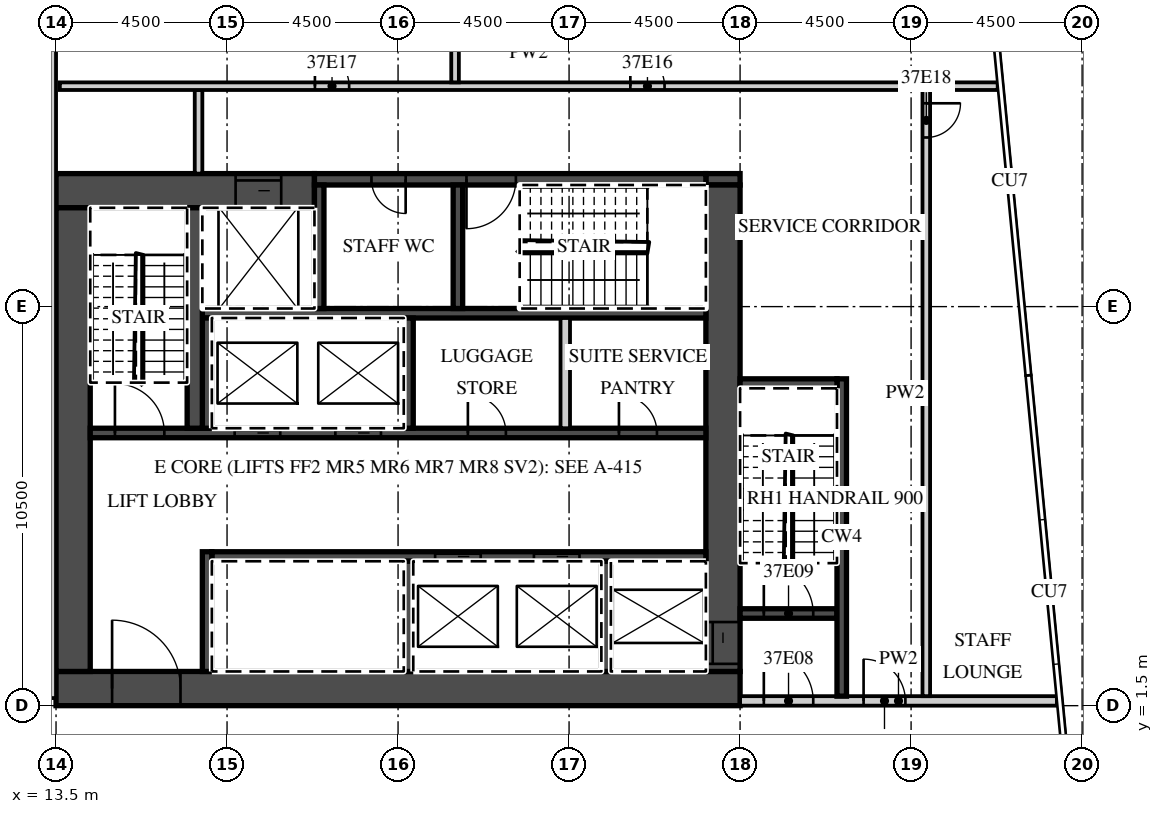
"""IFC4 building model, lengths in metres.
Left out: names, types, materials, properties, quantities, classifications, styles, units other than length and angle.
Written with IfcOpenShell. Run it as: python <this file> out.ifc"""

import sys

from ifc_helpers import new_model, si_unit, direction, frame, frame_2d, origin, place, context, subcontext, project, spatial, rectangle, extrude, element, fill, save


model = new_model("IFC4")
c1 = context("Model", 3, precision=1e-05, world=origin(), true_north=direction((0.0, 1.0)))
c2 = subcontext(c1, "Body", "Model", "MODEL_VIEW")
j1 = project(units=[si_unit("LENGTHUNIT", "METRE"), si_unit("PLANEANGLEUNIT", "RADIAN")], contexts=[c1])
p1 = place(None, origin())
s1 = spatial("IfcSite", under=j1, at=p1, CompositionType="ELEMENT")
p2 = place(p1, origin())
s2 = spatial("IfcBuilding", under=s1, at=p2, CompositionType="ELEMENT")
p3 = place(p2, frame((0.0, 0.0, 162.4)))
s3 = spatial("IfcBuildingStorey", under=s2, at=p3, CompositionType="ELEMENT", Elevation=162.4)
p4 = place(p3, frame((13.5, 1.95, 0.0), z_axis=(0.0, 0.0, 1.0), x_axis=(1.0, 0.0, 0.0)))
e1 = element("IfcWall", 1, at=p4, inside=s3, PredefinedType="SHEAR", context=c2, shape_type="SweptSolid", body=[
    extrude(rectangle(XDim=18.0, YDim=0.9, at=frame_2d((9.0, 0.0))), origin(), (0.0, 0.0, 1.0), 4.22),
])
p5 = place(p4, frame((1.475, 0.0, 0.0)))
e2 = element("IfcOpeningElement", 2, at=p5, cuts=e1, PredefinedType="OPENING", context=c2, shape_type="SweptSolid", body=[
    extrude(rectangle(XDim=1.8, YDim=2.1, at=frame_2d((0.9, 1.05))), frame((0.0, 0.46, 0.0), z_axis=(0.0, -1.0, 0.0), x_axis=(1.0, 0.0, 0.0)), (0.0, 0.0, 1.0), 0.92),
])
p6 = place(p3, frame((13.5, 15.05, 0.0), z_axis=(0.0, 0.0, 1.0), x_axis=(1.0, 0.0, 0.0)))
e3 = element("IfcWall", 3, at=p6, inside=s3, PredefinedType="SHEAR", context=c2, shape_type="SweptSolid", body=[
    extrude(rectangle(XDim=6.8, YDim=0.9, at=frame_2d((3.4, 0.0))), origin(), (0.0, 0.0, 1.0), 4.22),
])
p7 = place(p6, frame((4.725, 0.0, 0.0)))
e4 = element("IfcOpeningElement", 4, at=p7, cuts=e3, PredefinedType="OPENING", context=c2, shape_type="SweptSolid", body=[
    extrude(rectangle(XDim=1.2, YDim=2.1, at=frame_2d((0.6, 1.05))), frame((0.0, 0.46, 0.0), z_axis=(0.0, -1.0, 0.0), x_axis=(1.0, 0.0, 0.0)), (0.0, 0.0, 1.0), 0.92),
])
p8 = place(p3, frame((30.6, 15.35, 0.0), z_axis=(0.0, 0.0, 1.0), x_axis=(1.0, 0.0, 0.0)))
e5 = element("IfcWall", 5, at=p8, inside=s3, PredefinedType="SHEAR", context=c2, shape_type="SweptSolid", body=[
    extrude(rectangle(XDim=0.9, YDim=0.3, at=frame_2d((0.45, 0.0))), origin(), (0.0, 0.0, 1.0), 4.22),
])
p9 = place(p3, frame((20.3, 15.35, 0.0), z_axis=(0.0, 0.0, 1.0), x_axis=(1.0, 0.0, 0.0)))
e6 = element("IfcWall", 6, at=p9, inside=s3, PredefinedType="SHEAR", context=c2, shape_type="SweptSolid", body=[
    extrude(rectangle(XDim=10.3, YDim=0.3, at=frame_2d((5.15, 0.0))), origin(), (0.0, 0.0, 1.0), 4.22),
])
p10 = place(p9, frame((4.0, 0.0, 0.0)))
e7 = element("IfcOpeningElement", 7, at=p10, cuts=e6, PredefinedType="OPENING", context=c2, shape_type="SweptSolid", body=[
    extrude(rectangle(XDim=1.3, YDim=2.1, at=frame_2d((0.65, 1.05))), frame((0.0, 0.16, 0.0), z_axis=(0.0, -1.0, 0.0), x_axis=(1.0, 0.0, 0.0)), (0.0, 0.0, 1.0), 0.32),
])
p11 = place(p9, frame((1.5, 0.0, 0.0)))
e8 = element("IfcOpeningElement", 8, at=p11, cuts=e6, PredefinedType="OPENING", context=c2, shape_type="SweptSolid", body=[
    extrude(rectangle(XDim=0.9, YDim=2.1, at=frame_2d((0.45, 1.05))), frame((0.0, 0.16, 0.0), z_axis=(0.0, -1.0, 0.0), x_axis=(1.0, 0.0, 0.0)), (0.0, 0.0, 1.0), 0.32),
])
p12 = place(p3, frame((31.05, 2.4, 0.0), z_axis=(0.0, 0.0, 1.0), x_axis=(0.0, 1.0, 0.0)))
e9 = element("IfcWall", 9, at=p12, inside=s3, PredefinedType="SHEAR", context=c2, shape_type="SweptSolid", body=[
    extrude(rectangle(XDim=12.8, YDim=0.9, at=frame_2d((6.4, 0.0))), origin(), (0.0, 0.0, 1.0), 4.22),
])
p13 = place(p12, frame((0.2, 0.0, 0.0)))
e10 = element("IfcOpeningElement", 10, at=p13, cuts=e9, PredefinedType="OPENING", context=c2, shape_type="SweptSolid", body=[
    extrude(rectangle(XDim=1.1, YDim=2.1, at=frame_2d((0.55, 1.05))), frame((0.0, 0.46, 0.0), z_axis=(0.0, -1.0, 0.0), x_axis=(1.0, 0.0, 0.0)), (0.0, 0.0, 1.0), 0.92),
])
p14 = place(p3, frame((13.95, 2.4, 0.0), z_axis=(0.0, 0.0, 1.0), x_axis=(0.0, 1.0, 0.0)))
e11 = element("IfcWall", 11, at=p14, inside=s3, PredefinedType="SHEAR", context=c2, shape_type="SweptSolid", body=[
    extrude(rectangle(XDim=12.2, YDim=0.9, at=frame_2d((6.1, 0.0))), origin(), (0.0, 0.0, 1.0), 4.22),
])
p15 = place(p3, frame((17.6, 5.425, 0.0), z_axis=(0.0, 0.0, 1.0), x_axis=(1.0, 0.0, 0.0)))
e12 = element("IfcWall", 12, at=p15, inside=s3, PredefinedType="SHEAR", context=c2, shape_type="SweptSolid", body=[
    extrude(rectangle(XDim=13.0, YDim=0.25, at=frame_2d((6.5, 0.0))), origin(), (0.0, 0.0, 1.0), 4.22),
])
p16 = place(p15, frame((8.475, 0.0, 0.0)))
e13 = element("IfcOpeningElement", 13, at=p16, cuts=e12, PredefinedType="OPENING", context=c2, shape_type="SweptSolid", body=[
    extrude(rectangle(XDim=1.2, YDim=2.1, at=frame_2d((0.6, 1.05))), frame((0.0, 0.135, 0.0), z_axis=(0.0, -1.0, 0.0), x_axis=(1.0, 0.0, 0.0)), (0.0, 0.0, 1.0), 0.27),
])
p17 = place(p15, frame((5.875, 0.0, 0.0)))
e14 = element("IfcOpeningElement", 14, at=p17, cuts=e12, PredefinedType="OPENING", context=c2, shape_type="SweptSolid", body=[
    extrude(rectangle(XDim=1.2, YDim=2.1, at=frame_2d((0.6, 1.05))), frame((0.0, 0.135, 0.0), z_axis=(0.0, -1.0, 0.0), x_axis=(1.0, 0.0, 0.0)), (0.0, 0.0, 1.0), 0.27),
])
p18 = place(p3, frame((17.475, 2.4, 0.0), z_axis=(0.0, 0.0, 1.0), x_axis=(0.0, 1.0, 0.0)))
e15 = element("IfcWall", 15, at=p18, inside=s3, PredefinedType="SHEAR", context=c2, shape_type="SweptSolid", body=[
    extrude(rectangle(XDim=3.15, YDim=0.25, at=frame_2d((1.575, 0.0))), origin(), (0.0, 0.0, 1.0), 4.22),
])
for number, where, z_axis, x_axis in (
    (16, (27.975, 2.4, 0.0), (0.0, 0.0, 1.0), (0.0, 1.0, 0.0)),
    (17, (22.775, 2.4, 0.0), (0.0, 0.0, 1.0), (0.0, 1.0, 0.0)),
):
    element("IfcWall", number, at=place(p3, frame(where, z_axis=z_axis, x_axis=x_axis)), inside=s3, PredefinedType="SHEAR", context=c2, shape_type="SweptSolid", body=[
        extrude(rectangle(XDim=2.9, YDim=0.25, at=frame_2d((1.45, 0.0))), origin(), (0.0, 0.0, 1.0), 4.22),
    ])
p19 = place(p3, frame((14.4, 8.675, 0.0), z_axis=(0.0, 0.0, 1.0), x_axis=(1.0, 0.0, 0.0)))
e18 = element("IfcWall", 18, at=p19, inside=s3, PredefinedType="SHEAR", context=c2, shape_type="SweptSolid", body=[
    extrude(rectangle(XDim=16.2, YDim=0.25, at=frame_2d((8.1, 0.0))), origin(), (0.0, 0.0, 1.0), 4.22),
])
p20 = place(p19, frame((6.45, 0.0, 0.0)))
e19 = element("IfcOpeningElement", 19, at=p20, cuts=e18, PredefinedType="OPENING", context=c2, shape_type="SweptSolid", body=[
    extrude(rectangle(XDim=1.2, YDim=2.1, at=frame_2d((0.6, 1.05))), frame((0.0, 0.135, 0.0), z_axis=(0.0, -1.0, 0.0), x_axis=(1.0, 0.0, 0.0)), (0.0, 0.0, 1.0), 0.27),
])
p21 = place(p19, frame((3.8, 0.0, 0.0)))
e20 = element("IfcOpeningElement", 20, at=p21, cuts=e18, PredefinedType="OPENING", context=c2, shape_type="SweptSolid", body=[
    extrude(rectangle(XDim=1.2, YDim=2.1, at=frame_2d((0.6, 1.05))), frame((0.0, 0.135, 0.0), z_axis=(0.0, -1.0, 0.0), x_axis=(1.0, 0.0, 0.0)), (0.0, 0.0, 1.0), 0.27),
])
p22 = place(p19, frame((0.65, 0.0, 0.0)))
e21 = element("IfcOpeningElement", 21, at=p22, cuts=e18, PredefinedType="OPENING", context=c2, shape_type="SweptSolid", body=[
    extrude(rectangle(XDim=1.3, YDim=2.1, at=frame_2d((0.65, 1.05))), frame((0.0, 0.135, 0.0), z_axis=(0.0, -1.0, 0.0), x_axis=(1.0, 0.0, 0.0)), (0.0, 0.0, 1.0), 0.27),
])
p23 = place(p19, frame((13.913, 0.0, 0.0)))
e22 = element("IfcOpeningElement", 22, at=p23, cuts=e18, PredefinedType="OPENING", context=c2, shape_type="SweptSolid", body=[
    extrude(rectangle(XDim=1.0, YDim=2.1, at=frame_2d((0.5, 1.05))), frame((0.0, 0.135, 0.0), z_axis=(0.0, -1.0, 0.0), x_axis=(1.0, 0.0, 0.0)), (0.0, 0.0, 1.0), 0.27),
])
p24 = place(p19, frame((9.938, 0.0, 0.0)))
e23 = element("IfcOpeningElement", 23, at=p24, cuts=e18, PredefinedType="OPENING", context=c2, shape_type="SweptSolid", body=[
    extrude(rectangle(XDim=1.0, YDim=2.1, at=frame_2d((0.5, 1.05))), frame((0.0, 0.135, 0.0), z_axis=(0.0, -1.0, 0.0), x_axis=(1.0, 0.0, 0.0)), (0.0, 0.0, 1.0), 0.27),
])
p25 = place(p3, frame((17.35, 11.825, 0.0), z_axis=(0.0, 0.0, 1.0), x_axis=(1.0, 0.0, 0.0)))
e24 = element("IfcWall", 24, at=p25, inside=s3, PredefinedType="SHEAR", context=c2, shape_type="SweptSolid", body=[
    extrude(rectangle(XDim=13.25, YDim=0.25, at=frame_2d((6.625, 0.0))), origin(), (0.0, 0.0, 1.0), 4.22),
])
for number, where, z_axis, x_axis in (
    (25, (17.475, 8.8, 0.0), (0.0, 0.0, 1.0), (0.0, 1.0, 0.0)),
    (26, (22.775, 8.8, 0.0), (0.0, 0.0, 1.0), (0.0, 1.0, 0.0)),
):
    element("IfcWall", number, at=place(p3, frame(where, z_axis=z_axis, x_axis=x_axis)), inside=s3, PredefinedType="SHEAR", context=c2, shape_type="SweptSolid", body=[
        extrude(rectangle(XDim=2.9, YDim=0.25, at=frame_2d((1.45, 0.0))), origin(), (0.0, 0.0, 1.0), 4.22),
    ])
p26 = place(p3, frame((26.9, 8.8, 0.0), z_axis=(0.0, 0.0, 1.0), x_axis=(0.0, 1.0, 0.0)))
e27 = element("IfcWall", 27, at=p26, inside=s3, PredefinedType="PARTITIONING", context=c2, shape_type="SweptSolid", body=[
    extrude(rectangle(XDim=2.9, YDim=0.25, at=frame_2d((1.45, 0.0))), origin(), (0.0, 0.0, 1.0), 4.22),
])
p27 = place(p3, frame((17.15, 8.8, 0.0), z_axis=(0.0, 0.0, 1.0), x_axis=(0.0, 1.0, 0.0)))
e28 = element("IfcWall", 28, at=p27, inside=s3, PredefinedType="SHEAR", context=c2, shape_type="SweptSolid", body=[
    extrude(rectangle(XDim=5.8, YDim=0.4, at=frame_2d((2.9, 0.0))), origin(), (0.0, 0.0, 1.0), 4.22),
])
for number, where, z_axis, x_axis in (
    (29, (20.425, 11.95, 0.0), (0.0, 0.0, 1.0), (0.0, 1.0, 0.0)),
    (30, (24.075, 11.95, 0.0), (0.0, 0.0, 1.0), (0.0, 1.0, 0.0)),
):
    element("IfcWall", number, at=place(p3, frame(where, z_axis=z_axis, x_axis=x_axis)), inside=s3, PredefinedType="SHEAR", context=c2, shape_type="SweptSolid", body=[
        extrude(rectangle(XDim=3.25, YDim=0.25, at=frame_2d((1.625, 0.0))), origin(), (0.0, 0.0, 1.0), 4.22),
    ])
p28 = place(p3, frame((31.5, 1.625, 0.0), z_axis=(0.0, 0.0, 1.0), x_axis=(1.0, 0.0, 0.0)))
e31 = element("IfcWall", 31, at=p28, inside=s3, PredefinedType="PARTITIONING", context=c2, shape_type="SweptSolid", body=[
    extrude(rectangle(XDim=8.337, YDim=0.25, at=frame_2d((4.168, 0.0))), origin(), (0.0, 0.0, 1.0), 4.22),
])
p29 = place(p28, frame((0.625, 0.0, 0.0)))
e32 = element("IfcOpeningElement", 32, at=p29, cuts=e31, PredefinedType="OPENING", context=c2, shape_type="SweptSolid", body=[
    extrude(rectangle(XDim=1.3, YDim=2.1, at=frame_2d((0.65, 1.05))), frame((0.0, 0.135, 0.0), z_axis=(0.0, -1.0, 0.0), x_axis=(1.0, 0.0, 0.0)), (0.0, 0.0, 1.0), 0.27),
])
p30 = place(p28, frame((3.25, 0.0, 0.0)))
e33 = element("IfcOpeningElement", 33, at=p30, cuts=e31, PredefinedType="OPENING", context=c2, shape_type="SweptSolid", body=[
    extrude(rectangle(XDim=1.1, YDim=2.1, at=frame_2d((0.55, 1.05))), frame((0.0, 0.135, 0.0), z_axis=(0.0, -1.0, 0.0), x_axis=(1.0, 0.0, 0.0)), (0.0, 0.0, 1.0), 0.27),
])
p31 = place(p3, frame((31.5, 3.925, 0.0), z_axis=(0.0, 0.0, 1.0), x_axis=(1.0, 0.0, 0.0)))
e34 = element("IfcWall", 34, at=p31, inside=s3, PredefinedType="SHEAR", context=c2, shape_type="SweptSolid", body=[
    extrude(rectangle(XDim=2.55, YDim=0.25, at=frame_2d((1.275, 0.0))), origin(), (0.0, 0.0, 1.0), 4.22),
])
p32 = place(p31, frame((0.625, 0.0, 0.0)))
e35 = element("IfcOpeningElement", 35, at=p32, cuts=e34, PredefinedType="OPENING", context=c2, shape_type="SweptSolid", body=[
    extrude(rectangle(XDim=1.3, YDim=2.1, at=frame_2d((0.65, 1.05))), frame((0.0, 0.135, 0.0), z_axis=(0.0, -1.0, 0.0), x_axis=(1.0, 0.0, 0.0)), (0.0, 0.0, 1.0), 0.27),
])
p33 = place(p3, frame((34.175, 1.75, 0.0), z_axis=(0.0, 0.0, 1.0), x_axis=(0.0, 1.0, 0.0)))
e36 = element("IfcWall", 36, at=p33, inside=s3, PredefinedType="SHEAR", context=c2, shape_type="SweptSolid", body=[
    extrude(rectangle(XDim=8.35, YDim=0.25, at=frame_2d((4.175, 0.0))), origin(), (0.0, 0.0, 1.0), 4.22),
])
p34 = place(p3, frame((31.5, 9.975, 0.0), z_axis=(0.0, 0.0, 1.0), x_axis=(1.0, 0.0, 0.0)))
e37 = element("IfcWall", 37, at=p34, inside=s3, PredefinedType="SHEAR", context=c2, shape_type="SweptSolid", body=[
    extrude(rectangle(XDim=2.55, YDim=0.25, at=frame_2d((1.275, 0.0))), origin(), (0.0, 0.0, 1.0), 4.22),
])
p35 = place(p3, frame((17.25, 15.5, 0.0), z_axis=(0.0, 0.0, 1.0), x_axis=(0.0, 1.0, 0.0)))
e38 = element("IfcWall", 38, at=p35, inside=s3, PredefinedType="PARTITIONING", context=c2, shape_type="SweptSolid", body=[
    extrude(rectangle(XDim=2.2, YDim=0.2, at=frame_2d((1.1, 0.0))), origin(), (0.0, 0.0, 1.0), 4.22),
])
p36 = place(p3, frame((36.4, 1.75, 0.0), z_axis=(0.0, 0.0, 1.0), x_axis=(0.0, 1.0, 0.0)))
e39 = element("IfcWall", 39, at=p36, inside=s3, PredefinedType="PARTITIONING", context=c2, shape_type="SweptSolid", body=[
    extrude(rectangle(XDim=15.95, YDim=0.2, at=frame_2d((7.975, 0.0))), origin(), (0.0, 0.0, 1.0), 4.22),
])
p37 = place(p36, frame((14.7, 0.0, 0.0)))
e40 = element("IfcOpeningElement", 40, at=p37, cuts=e39, PredefinedType="OPENING", context=c2, shape_type="SweptSolid", body=[
    extrude(rectangle(XDim=0.9, YDim=2.1, at=frame_2d((0.45, 1.05))), frame((0.0, 0.11, 0.0), z_axis=(0.0, -1.0, 0.0), x_axis=(1.0, 0.0, 0.0)), (0.0, 0.0, 1.0), 0.22),
])
p38 = place(p3, frame((13.6, 17.8, 0.0), z_axis=(0.0, 0.0, 1.0), x_axis=(1.0, 0.0, 0.0)))
e41 = element("IfcWall", 41, at=p38, inside=s3, PredefinedType="PARTITIONING", context=c2, shape_type="SweptSolid", body=[
    extrude(rectangle(XDim=24.679, YDim=0.2, at=frame_2d((12.34, 0.0))), origin(), (0.0, 0.0, 1.0), 4.22),
])
p39 = place(p38, frame((15.012, 0.0, 0.0)))
e42 = element("IfcOpeningElement", 42, at=p39, cuts=e41, PredefinedType="OPENING", context=c2, shape_type="SweptSolid", body=[
    extrude(rectangle(XDim=0.9, YDim=2.1, at=frame_2d((0.45, 1.05))), frame((0.0, 0.11, 0.0), z_axis=(0.0, -1.0, 0.0), x_axis=(1.0, 0.0, 0.0)), (0.0, 0.0, 1.0), 0.22),
])
p40 = place(p38, frame((6.712, 0.0, 0.0)))
e43 = element("IfcOpeningElement", 43, at=p40, cuts=e41, PredefinedType="OPENING", context=c2, shape_type="SweptSolid", body=[
    extrude(rectangle(XDim=0.9, YDim=2.1, at=frame_2d((0.45, 1.05))), frame((0.0, 0.11, 0.0), z_axis=(0.0, -1.0, 0.0), x_axis=(1.0, 0.0, 0.0)), (0.0, 0.0, 1.0), 0.22),
])
p41 = place(p3, frame((24.0, 17.9, 0.0), z_axis=(0.0, 0.0, 1.0), x_axis=(0.0, 1.0, 0.0)))
e44 = element("IfcWall", 44, at=p41, inside=s3, PredefinedType="PARTITIONING", context=c2, shape_type="SweptSolid", body=[
    extrude(rectangle(XDim=4.701, YDim=0.2, at=frame_2d((2.351, 0.0))), origin(), (0.0, 0.0, 1.0), 4.22),
])
p42 = place(p3, frame((13.4, 1.7, 0.0), z_axis=(0.0, 0.0, 1.0), x_axis=(0.0, 1.0, 0.0)))
e45 = element("IfcWall", 45, at=p42, inside=s3, PredefinedType="PARTITIONING", context=c2, shape_type="SweptSolid", body=[
    extrude(rectangle(XDim=20.181, YDim=0.2, at=frame_2d((10.091, 0.0))), origin(), (0.0, 0.0, 1.0), 4.22),
])
p43 = place(p20, origin())
e46 = element("IfcDoor", 46, at=p43, inside=s3, OperationType="SLIDING_TO_LEFT", PredefinedType="DOOR", context=c2, shape_type="SweptSolid", body=[
    extrude(rectangle(XDim=1.2, YDim=2.1, at=frame_2d((0.6, 1.05))), frame((0.0, 0.025, 0.0), z_axis=(0.0, -1.0, 0.0), x_axis=(1.0, 0.0, 0.0)), (0.0, 0.0, 1.0), 0.05),
])
fill(e19, e46)
p44 = place(p21, origin())
e47 = element("IfcDoor", 47, at=p44, inside=s3, OperationType="SLIDING_TO_RIGHT", PredefinedType="DOOR", context=c2, shape_type="SweptSolid", body=[
    extrude(rectangle(XDim=1.2, YDim=2.1, at=frame_2d((0.6, 1.05))), frame((0.0, 0.025, 0.0), z_axis=(0.0, -1.0, 0.0), x_axis=(1.0, 0.0, 0.0)), (0.0, 0.0, 1.0), 0.05),
])
fill(e20, e47)
p45 = place(p16, origin())
e48 = element("IfcDoor", 48, at=p45, inside=s3, OperationType="SLIDING_TO_LEFT", PredefinedType="DOOR", context=c2, shape_type="SweptSolid", body=[
    extrude(rectangle(XDim=1.2, YDim=2.1, at=frame_2d((0.6, 1.05))), frame((0.0, 0.025, 0.0), z_axis=(0.0, -1.0, 0.0), x_axis=(1.0, 0.0, 0.0)), (0.0, 0.0, 1.0), 0.05),
])
fill(e13, e48)
p46 = place(p17, origin())
e49 = element("IfcDoor", 49, at=p46, inside=s3, OperationType="SLIDING_TO_RIGHT", PredefinedType="DOOR", context=c2, shape_type="SweptSolid", body=[
    extrude(rectangle(XDim=1.2, YDim=2.1, at=frame_2d((0.6, 1.05))), frame((0.0, 0.025, 0.0), z_axis=(0.0, -1.0, 0.0), x_axis=(1.0, 0.0, 0.0)), (0.0, 0.0, 1.0), 0.05),
])
fill(e14, e49)
p47 = place(p7, origin())
e50 = element("IfcDoor", 50, at=p47, inside=s3, OperationType="SLIDING_TO_LEFT", PredefinedType="DOOR", context=c2, shape_type="SweptSolid", body=[
    extrude(rectangle(XDim=1.2, YDim=2.1, at=frame_2d((0.6, 1.05))), frame((0.0, 0.025, 0.0), z_axis=(0.0, -1.0, 0.0), x_axis=(1.0, 0.0, 0.0)), (0.0, 0.0, 1.0), 0.05),
])
fill(e4, e50)
p48 = place(p13, origin())
e51 = element("IfcDoor", 51, at=p48, inside=s3, OperationType="SLIDING_TO_LEFT", PredefinedType="DOOR", context=c2, shape_type="SweptSolid", body=[
    extrude(rectangle(XDim=1.1, YDim=2.1, at=frame_2d((0.55, 1.05))), frame((0.0, 0.025, 0.0), z_axis=(0.0, -1.0, 0.0), x_axis=(1.0, 0.0, 0.0)), (0.0, 0.0, 1.0), 0.05),
])
fill(e10, e51)
p49 = place(p5, origin())
e52 = element("IfcDoor", 52, at=p49, inside=s3, OperationType="DOUBLE_DOOR_DOUBLE_SWING", PredefinedType="DOOR", context=c2, shape_type="SweptSolid", body=[
    extrude(rectangle(XDim=1.8, YDim=2.1, at=frame_2d((0.9, 1.05))), frame((0.0, 0.025, 0.0), z_axis=(0.0, -1.0, 0.0), x_axis=(1.0, 0.0, 0.0)), (0.0, 0.0, 1.0), 0.05),
])
fill(e2, e52)
p50 = place(p29, origin())
e53 = element("IfcDoor", 53, at=p50, inside=s3, OperationType="SINGLE_SWING_LEFT", PredefinedType="DOOR", context=c2, shape_type="SweptSolid", body=[
    extrude(rectangle(XDim=1.3, YDim=2.1, at=frame_2d((0.65, 1.05))), frame((0.0, 0.025, 0.0), z_axis=(0.0, -1.0, 0.0), x_axis=(1.0, 0.0, 0.0)), (0.0, 0.0, 1.0), 0.05),
])
fill(e32, e53)
p51 = place(p32, origin())
e54 = element("IfcDoor", 54, at=p51, inside=s3, OperationType="SINGLE_SWING_LEFT", PredefinedType="DOOR", context=c2, shape_type="SweptSolid", body=[
    extrude(rectangle(XDim=1.3, YDim=2.1, at=frame_2d((0.65, 1.05))), frame((0.0, 0.025, 0.0), z_axis=(0.0, -1.0, 0.0), x_axis=(1.0, 0.0, 0.0)), (0.0, 0.0, 1.0), 0.05),
])
fill(e35, e54)
p52 = place(p30, origin())
e55 = element("IfcDoor", 55, at=p52, inside=s3, OperationType="SINGLE_SWING_LEFT", PredefinedType="DOOR", context=c2, shape_type="SweptSolid", body=[
    extrude(rectangle(XDim=1.1, YDim=2.1, at=frame_2d((0.55, 1.05))), frame((0.0, 0.025, 0.0), z_axis=(0.0, -1.0, 0.0), x_axis=(1.0, 0.0, 0.0)), (0.0, 0.0, 1.0), 0.05),
])
fill(e33, e55)
p53 = place(p22, origin())
e56 = element("IfcDoor", 56, at=p53, inside=s3, OperationType="SINGLE_SWING_LEFT", PredefinedType="DOOR", context=c2, shape_type="SweptSolid", body=[
    extrude(rectangle(XDim=1.3, YDim=2.1, at=frame_2d((0.65, 1.05))), frame((0.0, 0.025, 0.0), z_axis=(0.0, -1.0, 0.0), x_axis=(1.0, 0.0, 0.0)), (0.0, 0.0, 1.0), 0.05),
])
fill(e21, e56)
p54 = place(p10, origin())
e57 = element("IfcDoor", 57, at=p54, inside=s3, OperationType="SINGLE_SWING_LEFT", PredefinedType="DOOR", context=c2, shape_type="SweptSolid", body=[
    extrude(rectangle(XDim=1.3, YDim=2.1, at=frame_2d((0.65, 1.05))), frame((0.0, 0.025, 0.0), z_axis=(0.0, -1.0, 0.0), x_axis=(1.0, 0.0, 0.0)), (0.0, 0.0, 1.0), 0.05),
])
fill(e7, e57)
p55 = place(p11, origin())
e58 = element("IfcDoor", 58, at=p55, inside=s3, OperationType="SINGLE_SWING_RIGHT", PredefinedType="DOOR", context=c2, shape_type="SweptSolid", body=[
    extrude(rectangle(XDim=0.9, YDim=2.1, at=frame_2d((0.45, 1.05))), frame((0.0, 0.025, 0.0), z_axis=(0.0, -1.0, 0.0), x_axis=(1.0, 0.0, 0.0)), (0.0, 0.0, 1.0), 0.05),
])
fill(e8, e58)
p56 = place(p23, origin())
e59 = element("IfcDoor", 59, at=p56, inside=s3, OperationType="SINGLE_SWING_LEFT", PredefinedType="DOOR", context=c2, shape_type="SweptSolid", body=[
    extrude(rectangle(XDim=1.0, YDim=2.1, at=frame_2d((0.5, 1.05))), frame((0.0, 0.025, 0.0), z_axis=(0.0, -1.0, 0.0), x_axis=(1.0, 0.0, 0.0)), (0.0, 0.0, 1.0), 0.05),
])
fill(e22, e59)
p57 = place(p24, origin())
e60 = element("IfcDoor", 60, at=p57, inside=s3, OperationType="SINGLE_SWING_LEFT", PredefinedType="DOOR", context=c2, shape_type="SweptSolid", body=[
    extrude(rectangle(XDim=1.0, YDim=2.1, at=frame_2d((0.5, 1.05))), frame((0.0, 0.025, 0.0), z_axis=(0.0, -1.0, 0.0), x_axis=(1.0, 0.0, 0.0)), (0.0, 0.0, 1.0), 0.05),
])
fill(e23, e60)
p58 = place(p39, origin())
e61 = element("IfcDoor", 61, at=p58, inside=s3, OperationType="SINGLE_SWING_LEFT", PredefinedType="DOOR", context=c2, shape_type="SweptSolid", body=[
    extrude(rectangle(XDim=0.9, YDim=2.1, at=frame_2d((0.45, 1.05))), frame((0.0, 0.025, 0.0), z_axis=(0.0, -1.0, 0.0), x_axis=(1.0, 0.0, 0.0)), (0.0, 0.0, 1.0), 0.05),
])
fill(e42, e61)
p59 = place(p40, origin())
e62 = element("IfcDoor", 62, at=p59, inside=s3, OperationType="SINGLE_SWING_LEFT", PredefinedType="DOOR", context=c2, shape_type="SweptSolid", body=[
    extrude(rectangle(XDim=0.9, YDim=2.1, at=frame_2d((0.45, 1.05))), frame((0.0, 0.025, 0.0), z_axis=(0.0, -1.0, 0.0), x_axis=(1.0, 0.0, 0.0)), (0.0, 0.0, 1.0), 0.05),
])
fill(e43, e62)
p60 = place(p37, origin())
e63 = element("IfcDoor", 63, at=p60, inside=s3, OperationType="SINGLE_SWING_RIGHT", PredefinedType="DOOR", context=c2, shape_type="SweptSolid", body=[
    extrude(rectangle(XDim=0.9, YDim=2.1, at=frame_2d((0.45, 1.05))), frame((0.0, 0.025, 0.0), z_axis=(0.0, -1.0, 0.0), x_axis=(1.0, 0.0, 0.0)), (0.0, 0.0, 1.0), 0.05),
])
fill(e40, e63)
save(model, sys.argv[1])
